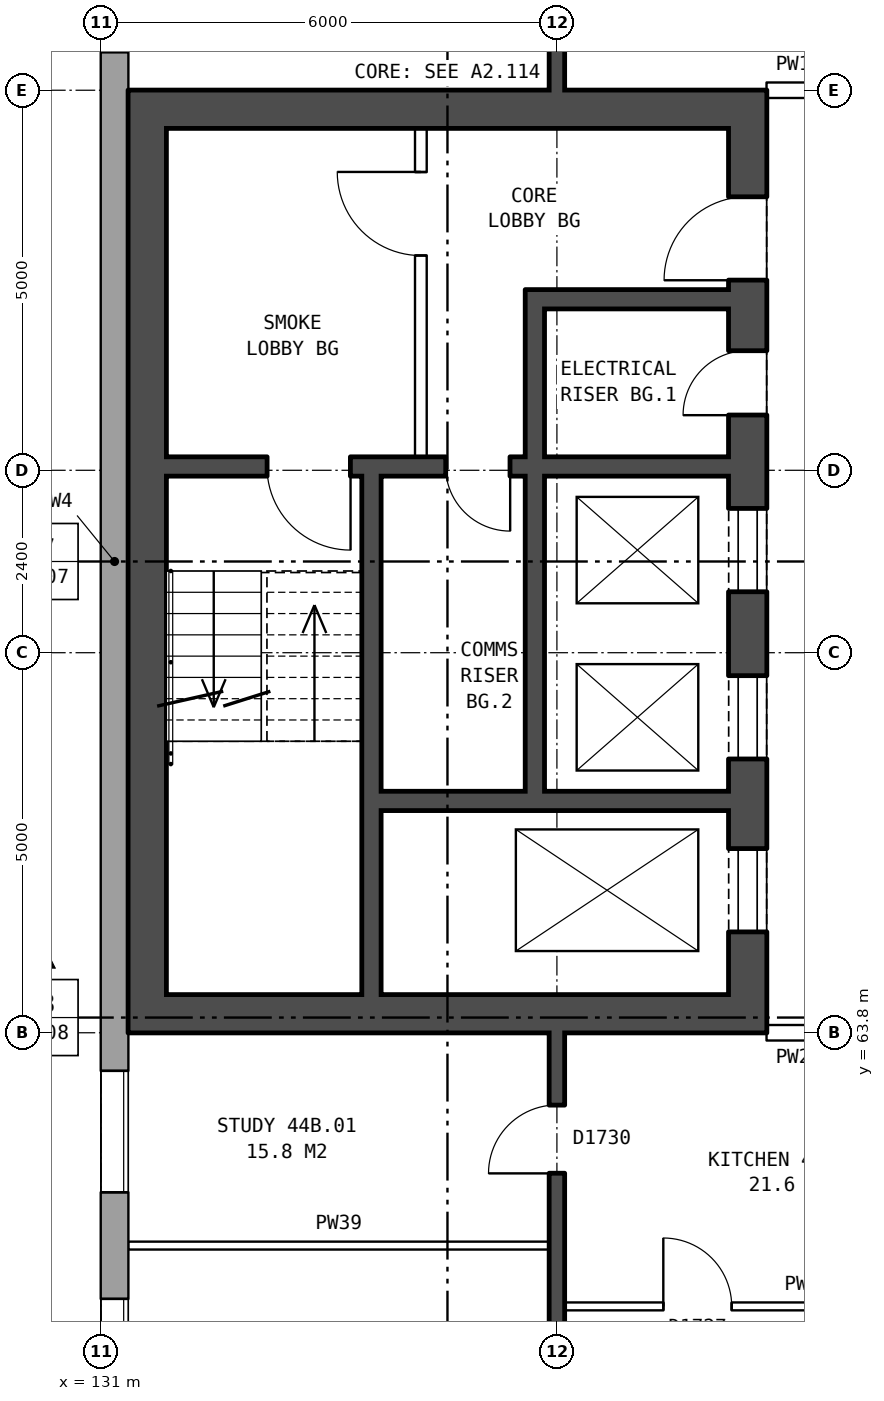
"""IFC4 building model, lengths in metres.
Left out: names, types, materials, properties, quantities, classifications, styles, units other than length and angle.
Written with IfcOpenShell. Run it as: python <this file> out.ifc"""

import sys

from ifc_helpers import new_model, si_unit, direction, frame, frame_2d, origin, place, context, subcontext, project, spatial, rectangle, extrude, element, fill, save


model = new_model("IFC4")
c1 = context("Model", 3, precision=1e-05, world=origin(), true_north=direction((0.0, 1.0)))
c2 = subcontext(c1, "Body", "Model", "MODEL_VIEW")
j1 = project(units=[si_unit("LENGTHUNIT", "METRE"), si_unit("PLANEANGLEUNIT", "RADIAN")], contexts=[c1])
p1 = place(None, origin())
s1 = spatial("IfcSite", under=j1, at=p1, CompositionType="ELEMENT")
p2 = place(p1, origin())
s2 = spatial("IfcBuilding", under=s1, at=p2, CompositionType="ELEMENT")
p3 = place(p2, frame((0.0, 0.0, 157.8)))
s3 = spatial("IfcBuildingStorey", under=s2, at=p3, CompositionType="ELEMENT", Elevation=157.8)
p4 = place(p3, frame((131.18, 82.925, 0.0), z_axis=(0.0, 0.0, 1.0), x_axis=(0.0, -1.0, 0.0)))
e1 = element("IfcWall", 1, at=p4, inside=s3, PredefinedType="STANDARD", context=c2, shape_type="SweptSolid", body=[
    extrude(rectangle(XDim=25.851, YDim=0.36, at=frame_2d((12.925, 0.0))), origin(), (0.0, 0.0, 1.0), 2.85),
])
p5 = place(p4, frame((1.625, 0.0, 0.8)))
e2 = element("IfcOpeningElement", 2, at=p5, cuts=e1, PredefinedType="OPENING", context=c2, shape_type="SweptSolid", body=[
    extrude(rectangle(XDim=1.6, YDim=1.8, at=frame_2d((0.8, 0.9))), frame((0.0, 0.19, 0.0), z_axis=(0.0, -1.0, 0.0), x_axis=(1.0, 0.0, 0.0)), (0.0, 0.0, 1.0), 0.38),
])
p6 = place(p4, frame((4.625, 0.0, 0.8)))
e3 = element("IfcOpeningElement", 3, at=p6, cuts=e1, PredefinedType="OPENING", context=c2, shape_type="SweptSolid", body=[
    extrude(rectangle(XDim=1.6, YDim=1.8, at=frame_2d((0.8, 0.9))), frame((0.0, 0.19, 0.0), z_axis=(0.0, -1.0, 0.0), x_axis=(1.0, 0.0, 0.0)), (0.0, 0.0, 1.0), 0.38),
])
p7 = place(p4, frame((19.625, 0.0, 0.8)))
e4 = element("IfcOpeningElement", 4, at=p7, cuts=e1, PredefinedType="OPENING", context=c2, shape_type="SweptSolid", body=[
    extrude(rectangle(XDim=1.6, YDim=1.8, at=frame_2d((0.8, 0.9))), frame((0.0, 0.19, 0.0), z_axis=(0.0, -1.0, 0.0), x_axis=(1.0, 0.0, 0.0)), (0.0, 0.0, 1.0), 0.38),
])
p8 = place(p4, frame((22.625, 0.0, 0.8)))
e5 = element("IfcOpeningElement", 5, at=p8, cuts=e1, PredefinedType="OPENING", context=c2, shape_type="SweptSolid", body=[
    extrude(rectangle(XDim=1.6, YDim=1.8, at=frame_2d((0.8, 0.9))), frame((0.0, 0.19, 0.0), z_axis=(0.0, -1.0, 0.0), x_axis=(1.0, 0.0, 0.0)), (0.0, 0.0, 1.0), 0.38),
])
p9 = place(p3, frame((139.51, 63.8, 0.0), z_axis=(0.0, 0.0, 1.0), x_axis=(0.0, 1.0, 0.0)))
e6 = element("IfcWall", 6, at=p9, inside=s3, PredefinedType="SHEAR", context=c2, shape_type="SweptSolid", body=[
    extrude(rectangle(XDim=12.4, YDim=0.5, at=frame_2d((6.2, 0.0))), origin(), (0.0, 0.0, 1.0), 2.85),
])
p10 = place(p9, frame((1.325, 0.0, 0.0)))
e7 = element("IfcOpeningElement", 7, at=p10, cuts=e6, PredefinedType="OPENING", context=c2, shape_type="SweptSolid", body=[
    extrude(rectangle(XDim=1.1, YDim=2.1, at=frame_2d((0.55, 1.05))), frame((0.0, 0.26, 0.0), z_axis=(0.0, -1.0, 0.0), x_axis=(1.0, 0.0, 0.0)), (0.0, 0.0, 1.0), 0.52),
])
p11 = place(p9, frame((3.6, 0.0, 0.0)))
e8 = element("IfcOpeningElement", 8, at=p11, cuts=e6, PredefinedType="OPENING", context=c2, shape_type="SweptSolid", body=[
    extrude(rectangle(XDim=1.1, YDim=2.1, at=frame_2d((0.55, 1.05))), frame((0.0, 0.26, 0.0), z_axis=(0.0, -1.0, 0.0), x_axis=(1.0, 0.0, 0.0)), (0.0, 0.0, 1.0), 0.52),
])
p12 = place(p9, frame((5.8, 0.0, 0.0)))
e9 = element("IfcOpeningElement", 9, at=p12, cuts=e6, PredefinedType="OPENING", context=c2, shape_type="SweptSolid", body=[
    extrude(rectangle(XDim=1.1, YDim=2.1, at=frame_2d((0.55, 1.05))), frame((0.0, 0.26, 0.0), z_axis=(0.0, -1.0, 0.0), x_axis=(1.0, 0.0, 0.0)), (0.0, 0.0, 1.0), 0.52),
])
p13 = place(p9, frame((9.9, 0.0, 0.0)))
e10 = element("IfcOpeningElement", 10, at=p13, cuts=e6, PredefinedType="OPENING", context=c2, shape_type="SweptSolid", body=[
    extrude(rectangle(XDim=1.1, YDim=2.1, at=frame_2d((0.55, 1.05))), frame((0.0, 0.26, 0.0), z_axis=(0.0, -1.0, 0.0), x_axis=(1.0, 0.0, 0.0)), (0.0, 0.0, 1.0), 0.52),
])
p14 = place(p9, frame((8.125, 0.0, 0.0)))
e11 = element("IfcOpeningElement", 11, at=p14, cuts=e6, PredefinedType="OPENING", context=c2, shape_type="SweptSolid", body=[
    extrude(rectangle(XDim=0.85, YDim=2.1, at=frame_2d((0.425, 1.05))), frame((0.0, 0.26, 0.0), z_axis=(0.0, -1.0, 0.0), x_axis=(1.0, 0.0, 0.0)), (0.0, 0.0, 1.0), 0.52),
])
p15 = place(p3, frame((131.61, 63.8, 0.0), z_axis=(0.0, 0.0, 1.0), x_axis=(0.0, 1.0, 0.0)))
e12 = element("IfcWall", 12, at=p15, inside=s3, PredefinedType="SHEAR", context=c2, shape_type="SweptSolid", body=[
    extrude(rectangle(XDim=12.4, YDim=0.5, at=frame_2d((6.2, 0.0))), origin(), (0.0, 0.0, 1.0), 2.85),
])
for number, where, z_axis, x_axis in (
    (13, (139.26, 64.05, 0.0), (0.0, 0.0, 1.0), (-1.0, 0.0, 0.0)),
    (14, (139.26, 75.95, 0.0), (0.0, 0.0, 1.0), (-1.0, 0.0, 0.0)),
):
    element("IfcWall", number, at=place(p3, frame(where, z_axis=z_axis, x_axis=x_axis)), inside=s3, PredefinedType="SHEAR", context=c2, shape_type="SweptSolid", body=[
        extrude(rectangle(XDim=7.4, YDim=0.5, at=frame_2d((3.7, 0.0))), origin(), (0.0, 0.0, 1.0), 2.85),
    ])
p16 = place(p3, frame((139.26, 66.85, 0.0), z_axis=(0.0, 0.0, 1.0), x_axis=(-1.0, 0.0, 0.0)))
e15 = element("IfcWall", 15, at=p16, inside=s3, PredefinedType="SHEAR", context=c2, shape_type="SweptSolid", body=[
    extrude(rectangle(XDim=4.575, YDim=0.25, at=frame_2d((2.288, 0.0))), origin(), (0.0, 0.0, 1.0), 2.85),
])
p17 = place(p3, frame((139.26, 71.25, 0.0), z_axis=(0.0, 0.0, 1.0), x_axis=(-1.0, 0.0, 0.0)))
e16 = element("IfcWall", 16, at=p17, inside=s3, PredefinedType="SHEAR", context=c2, shape_type="SweptSolid", body=[
    extrude(rectangle(XDim=7.4, YDim=0.25, at=frame_2d((3.7, 0.0))), origin(), (0.0, 0.0, 1.0), 2.85),
])
p18 = place(p17, frame((4.975, 0.0, 0.0)))
e17 = element("IfcOpeningElement", 17, at=p18, cuts=e16, PredefinedType="OPENING", context=c2, shape_type="SweptSolid", body=[
    extrude(rectangle(XDim=1.1, YDim=2.1, at=frame_2d((0.55, 1.05))), frame((0.0, 0.135, 0.0), z_axis=(0.0, -1.0, 0.0), x_axis=(1.0, 0.0, 0.0)), (0.0, 0.0, 1.0), 0.27),
])
p19 = place(p17, frame((2.875, 0.0, 0.0)))
e18 = element("IfcOpeningElement", 18, at=p19, cuts=e16, PredefinedType="OPENING", context=c2, shape_type="SweptSolid", body=[
    extrude(rectangle(XDim=0.85, YDim=2.1, at=frame_2d((0.425, 1.05))), frame((0.0, 0.135, 0.0), z_axis=(0.0, -1.0, 0.0), x_axis=(1.0, 0.0, 0.0)), (0.0, 0.0, 1.0), 0.27),
])
p20 = place(p3, frame((139.26, 73.45, 0.0), z_axis=(0.0, 0.0, 1.0), x_axis=(-1.0, 0.0, 0.0)))
e19 = element("IfcWall", 19, at=p20, inside=s3, PredefinedType="SHEAR", context=c2, shape_type="SweptSolid", body=[
    extrude(rectangle(XDim=2.425, YDim=0.25, at=frame_2d((1.212, 0.0))), origin(), (0.0, 0.0, 1.0), 2.85),
])
p21 = place(p3, frame((136.71, 66.975, 0.0), z_axis=(0.0, 0.0, 1.0), x_axis=(0.0, 1.0, 0.0)))
e20 = element("IfcWall", 20, at=p21, inside=s3, PredefinedType="SHEAR", context=c2, shape_type="SweptSolid", body=[
    extrude(rectangle(XDim=4.15, YDim=0.25, at=frame_2d((2.075, 0.0))), origin(), (0.0, 0.0, 1.0), 2.85),
])
p22 = place(p3, frame((136.71, 71.375, 0.0), z_axis=(0.0, 0.0, 1.0), x_axis=(0.0, 1.0, 0.0)))
e21 = element("IfcWall", 21, at=p22, inside=s3, PredefinedType="SHEAR", context=c2, shape_type="SweptSolid", body=[
    extrude(rectangle(XDim=2.2, YDim=0.25, at=frame_2d((1.1, 0.0))), origin(), (0.0, 0.0, 1.0), 2.85),
])
p23 = place(p3, frame((135.21, 71.375, 0.0), z_axis=(0.0, 0.0, 1.0), x_axis=(0.0, 1.0, 0.0)))
e22 = element("IfcWall", 22, at=p23, inside=s3, PredefinedType="PARTITIONING", context=c2, shape_type="SweptSolid", body=[
    extrude(rectangle(XDim=4.325, YDim=0.15, at=frame_2d((2.163, 0.0))), origin(), (0.0, 0.0, 1.0), 2.85),
])
p24 = place(p23, frame((2.65, 0.0, 0.0)))
e23 = element("IfcOpeningElement", 23, at=p24, cuts=e22, PredefinedType="OPENING", context=c2, shape_type="SweptSolid", body=[
    extrude(rectangle(XDim=1.1, YDim=2.1, at=frame_2d((0.55, 1.05))), frame((0.0, 0.085, 0.0), z_axis=(0.0, -1.0, 0.0), x_axis=(1.0, 0.0, 0.0)), (0.0, 0.0, 1.0), 0.17),
])
p25 = place(p3, frame((134.56, 64.3, 0.0), z_axis=(0.0, 0.0, 1.0), x_axis=(0.0, 1.0, 0.0)))
e24 = element("IfcWall", 24, at=p25, inside=s3, PredefinedType="SHEAR", context=c2, shape_type="SweptSolid", body=[
    extrude(rectangle(XDim=6.825, YDim=0.25, at=frame_2d((3.413, 0.0))), origin(), (0.0, 0.0, 1.0), 2.85),
])
p26 = place(p3, frame((137.1, 60.2, 0.0), z_axis=(0.0, 0.0, 1.0), x_axis=(1.0, 0.0, 0.0)))
e25 = element("IfcWall", 25, at=p26, inside=s3, PredefinedType="PARTITIONING", context=c2, shape_type="SweptSolid", body=[
    extrude(rectangle(XDim=5.8, YDim=0.1, at=frame_2d((2.9, 0.0))), origin(), (0.0, 0.0, 1.0), 2.85),
])
p27 = place(p26, frame((1.3, 0.0, 0.0)))
e26 = element("IfcOpeningElement", 26, at=p27, cuts=e25, PredefinedType="OPENING", context=c2, shape_type="SweptSolid", body=[
    extrude(rectangle(XDim=0.9, YDim=2.1, at=frame_2d((0.45, 1.05))), frame((0.0, 0.06, 0.0), z_axis=(0.0, -1.0, 0.0), x_axis=(1.0, 0.0, 0.0)), (0.0, 0.0, 1.0), 0.12),
])
p28 = place(p26, frame((4.2, 0.0, 0.0)))
e27 = element("IfcOpeningElement", 27, at=p28, cuts=e25, PredefinedType="OPENING", context=c2, shape_type="SweptSolid", body=[
    extrude(rectangle(XDim=0.9, YDim=2.1, at=frame_2d((0.45, 1.05))), frame((0.0, 0.06, 0.0), z_axis=(0.0, -1.0, 0.0), x_axis=(1.0, 0.0, 0.0)), (0.0, 0.0, 1.0), 0.12),
])
p29 = place(p3, frame((131.36, 61.0, 0.0), z_axis=(0.0, 0.0, 1.0), x_axis=(1.0, 0.0, 0.0)))
e28 = element("IfcWall", 28, at=p29, inside=s3, PredefinedType="PARTITIONING", context=c2, shape_type="SweptSolid", body=[
    extrude(rectangle(XDim=5.54, YDim=0.1, at=frame_2d((2.77, 0.0))), origin(), (0.0, 0.0, 1.0), 2.85),
])
p30 = place(p3, frame((139.76, 63.8, 0.0), z_axis=(0.0, 0.0, 1.0), x_axis=(1.0, 0.0, 0.0)))
e29 = element("IfcWall", 29, at=p30, inside=s3, PredefinedType="PARTITIONING", context=c2, shape_type="SweptSolid", body=[
    extrude(rectangle(XDim=3.0, YDim=0.2, at=frame_2d((1.5, 0.0))), origin(), (0.0, 0.0, 1.0), 2.85),
])
p31 = place(p30, frame((1.0, 0.0, 0.0)))
e30 = element("IfcOpeningElement", 30, at=p31, cuts=e29, PredefinedType="OPENING", context=c2, shape_type="SweptSolid", body=[
    extrude(rectangle(XDim=1.0, YDim=2.1, at=frame_2d((0.5, 1.05))), frame((0.0, 0.11, 0.0), z_axis=(0.0, -1.0, 0.0), x_axis=(1.0, 0.0, 0.0)), (0.0, 0.0, 1.0), 0.22),
])
p32 = place(p3, frame((139.76, 76.2, 0.0), z_axis=(0.0, 0.0, 1.0), x_axis=(1.0, 0.0, 0.0)))
e31 = element("IfcWall", 31, at=p32, inside=s3, PredefinedType="PARTITIONING", context=c2, shape_type="SweptSolid", body=[
    extrude(rectangle(XDim=3.0, YDim=0.2, at=frame_2d((1.5, 0.0))), origin(), (0.0, 0.0, 1.0), 2.85),
])
p33 = place(p32, frame((1.0, 0.0, 0.0)))
e32 = element("IfcOpeningElement", 32, at=p33, cuts=e31, PredefinedType="OPENING", context=c2, shape_type="SweptSolid", body=[
    extrude(rectangle(XDim=1.0, YDim=2.1, at=frame_2d((0.5, 1.05))), frame((0.0, 0.11, 0.0), z_axis=(0.0, -1.0, 0.0), x_axis=(1.0, 0.0, 0.0)), (0.0, 0.0, 1.0), 0.22),
])
p34 = place(p3, frame((137.0, 54.36, 0.0), z_axis=(0.0, 0.0, 1.0), x_axis=(0.0, 1.0, 0.0)))
e33 = element("IfcWall", 33, at=p34, inside=s3, PredefinedType="SOLIDWALL", context=c2, shape_type="SweptSolid", body=[
    extrude(rectangle(XDim=9.44, YDim=0.2, at=frame_2d((4.72, 0.0))), origin(), (0.0, 0.0, 1.0), 2.85),
])
p35 = place(p34, frame((2.47, 0.0, 0.0)))
e34 = element("IfcOpeningElement", 34, at=p35, cuts=e33, PredefinedType="OPENING", context=c2, shape_type="SweptSolid", body=[
    extrude(rectangle(XDim=0.9, YDim=2.1, at=frame_2d((0.45, 1.05))), frame((0.0, 0.11, 0.0), z_axis=(0.0, -1.0, 0.0), x_axis=(1.0, 0.0, 0.0)), (0.0, 0.0, 1.0), 0.22),
])
p36 = place(p34, frame((7.59, 0.0, 0.0)))
e35 = element("IfcOpeningElement", 35, at=p36, cuts=e33, PredefinedType="OPENING", context=c2, shape_type="SweptSolid", body=[
    extrude(rectangle(XDim=0.9, YDim=2.1, at=frame_2d((0.45, 1.05))), frame((0.0, 0.11, 0.0), z_axis=(0.0, -1.0, 0.0), x_axis=(1.0, 0.0, 0.0)), (0.0, 0.0, 1.0), 0.22),
])
p37 = place(p3, frame((137.0, 76.2, 0.0), z_axis=(0.0, 0.0, 1.0), x_axis=(0.0, 1.0, 0.0)))
e36 = element("IfcWall", 36, at=p37, inside=s3, PredefinedType="SOLIDWALL", context=c2, shape_type="SweptSolid", body=[
    extrude(rectangle(XDim=9.44, YDim=0.2, at=frame_2d((4.72, 0.0))), origin(), (0.0, 0.0, 1.0), 2.85),
])
p38 = place(p37, frame((1.35, 0.0, 0.0)))
e37 = element("IfcOpeningElement", 37, at=p38, cuts=e36, PredefinedType="OPENING", context=c2, shape_type="SweptSolid", body=[
    extrude(rectangle(XDim=0.9, YDim=2.1, at=frame_2d((0.45, 1.05))), frame((0.0, 0.11, 0.0), z_axis=(0.0, -1.0, 0.0), x_axis=(1.0, 0.0, 0.0)), (0.0, 0.0, 1.0), 0.22),
])
p39 = place(p6, origin())
e38 = element("IfcWindow", 38, at=p39, inside=s3, PartitioningType="SINGLE_PANEL", PredefinedType="WINDOW", context=c2, shape_type="SweptSolid", body=[
    extrude(rectangle(XDim=1.6, YDim=1.8, at=frame_2d((0.8, 0.9))), frame((0.0, 0.15, 0.0), z_axis=(0.0, -1.0, 0.0), x_axis=(1.0, 0.0, 0.0)), (0.0, 0.0, 1.0), 0.06),
])
fill(e3, e38)
p40 = place(p7, origin())
e39 = element("IfcWindow", 39, at=p40, inside=s3, PartitioningType="SINGLE_PANEL", PredefinedType="WINDOW", context=c2, shape_type="SweptSolid", body=[
    extrude(rectangle(XDim=1.6, YDim=1.8, at=frame_2d((0.8, 0.9))), frame((0.0, 0.15, 0.0), z_axis=(0.0, -1.0, 0.0), x_axis=(1.0, 0.0, 0.0)), (0.0, 0.0, 1.0), 0.06),
])
fill(e4, e39)
p41 = place(p8, origin())
e40 = element("IfcWindow", 40, at=p41, inside=s3, PartitioningType="SINGLE_PANEL", PredefinedType="WINDOW", context=c2, shape_type="SweptSolid", body=[
    extrude(rectangle(XDim=1.6, YDim=1.8, at=frame_2d((0.8, 0.9))), frame((0.0, 0.15, 0.0), z_axis=(0.0, -1.0, 0.0), x_axis=(1.0, 0.0, 0.0)), (0.0, 0.0, 1.0), 0.06),
])
fill(e5, e40)
p42 = place(p10, origin())
e41 = element("IfcDoor", 41, at=p42, inside=s3, OperationType="DOUBLE_DOOR_SLIDING", PredefinedType="DOOR", context=c2, shape_type="SweptSolid", body=[
    extrude(rectangle(XDim=1.1, YDim=2.1, at=frame_2d((0.55, 1.05))), frame((0.0, 0.235, 0.0), z_axis=(0.0, -1.0, 0.0), x_axis=(1.0, 0.0, 0.0)), (0.0, 0.0, 1.0), 0.05),
])
fill(e7, e41)
p43 = place(p11, origin())
e42 = element("IfcDoor", 42, at=p43, inside=s3, OperationType="DOUBLE_DOOR_SLIDING", PredefinedType="DOOR", context=c2, shape_type="SweptSolid", body=[
    extrude(rectangle(XDim=1.1, YDim=2.1, at=frame_2d((0.55, 1.05))), frame((0.0, 0.235, 0.0), z_axis=(0.0, -1.0, 0.0), x_axis=(1.0, 0.0, 0.0)), (0.0, 0.0, 1.0), 0.05),
])
fill(e8, e42)
p44 = place(p12, origin())
e43 = element("IfcDoor", 43, at=p44, inside=s3, OperationType="DOUBLE_DOOR_SLIDING", PredefinedType="DOOR", context=c2, shape_type="SweptSolid", body=[
    extrude(rectangle(XDim=1.1, YDim=2.1, at=frame_2d((0.55, 1.05))), frame((0.0, 0.235, 0.0), z_axis=(0.0, -1.0, 0.0), x_axis=(1.0, 0.0, 0.0)), (0.0, 0.0, 1.0), 0.05),
])
fill(e9, e43)
p45 = place(p13, origin())
e44 = element("IfcDoor", 44, at=p45, inside=s3, OperationType="SINGLE_SWING_LEFT", PredefinedType="DOOR", context=c2, shape_type="SweptSolid", body=[
    extrude(rectangle(XDim=1.1, YDim=2.1, at=frame_2d((0.55, 1.05))), frame((0.0, 0.235, 0.0), z_axis=(0.0, -1.0, 0.0), x_axis=(1.0, 0.0, 0.0)), (0.0, 0.0, 1.0), 0.05),
])
fill(e10, e44)
p46 = place(p24, origin())
e45 = element("IfcDoor", 45, at=p46, inside=s3, OperationType="SINGLE_SWING_RIGHT", PredefinedType="DOOR", context=c2, shape_type="SweptSolid", body=[
    extrude(rectangle(XDim=1.1, YDim=2.1, at=frame_2d((0.55, 1.05))), frame((0.0, 0.025, 0.0), z_axis=(0.0, -1.0, 0.0), x_axis=(1.0, 0.0, 0.0)), (0.0, 0.0, 1.0), 0.05),
])
fill(e23, e45)
p47 = place(p18, origin())
e46 = element("IfcDoor", 46, at=p47, inside=s3, OperationType="SINGLE_SWING_LEFT", PredefinedType="DOOR", context=c2, shape_type="SweptSolid", body=[
    extrude(rectangle(XDim=1.1, YDim=2.1, at=frame_2d((0.55, 1.05))), frame((0.0, 0.025, 0.0), z_axis=(0.0, -1.0, 0.0), x_axis=(1.0, 0.0, 0.0)), (0.0, 0.0, 1.0), 0.05),
])
fill(e17, e46)
p48 = place(p14, origin())
e47 = element("IfcDoor", 47, at=p48, inside=s3, OperationType="SINGLE_SWING_LEFT", PredefinedType="DOOR", context=c2, shape_type="SweptSolid", body=[
    extrude(rectangle(XDim=0.85, YDim=2.1, at=frame_2d((0.425, 1.05))), frame((0.0, 0.235, 0.0), z_axis=(0.0, -1.0, 0.0), x_axis=(1.0, 0.0, 0.0)), (0.0, 0.0, 1.0), 0.05),
])
fill(e11, e47)
p49 = place(p19, origin())
e48 = element("IfcDoor", 48, at=p49, inside=s3, OperationType="SINGLE_SWING_LEFT", PredefinedType="DOOR", context=c2, shape_type="SweptSolid", body=[
    extrude(rectangle(XDim=0.85, YDim=2.1, at=frame_2d((0.425, 1.05))), frame((0.0, 0.025, 0.0), z_axis=(0.0, -1.0, 0.0), x_axis=(1.0, 0.0, 0.0)), (0.0, 0.0, 1.0), 0.05),
])
fill(e18, e48)
p50 = place(p36, origin())
e49 = element("IfcDoor", 49, at=p50, inside=s3, OperationType="SINGLE_SWING_LEFT", PredefinedType="DOOR", context=c2, shape_type="SweptSolid", body=[
    extrude(rectangle(XDim=0.9, YDim=2.1, at=frame_2d((0.45, 1.05))), frame((0.0, 0.025, 0.0), z_axis=(0.0, -1.0, 0.0), x_axis=(1.0, 0.0, 0.0)), (0.0, 0.0, 1.0), 0.05),
])
fill(e35, e49)
p51 = place(p27, origin())
e50 = element("IfcDoor", 50, at=p51, inside=s3, OperationType="SINGLE_SWING_LEFT", PredefinedType="DOOR", context=c2, shape_type="SweptSolid", body=[
    extrude(rectangle(XDim=0.9, YDim=2.1, at=frame_2d((0.45, 1.05))), frame((0.0, 0.025, 0.0), z_axis=(0.0, -1.0, 0.0), x_axis=(1.0, 0.0, 0.0)), (0.0, 0.0, 1.0), 0.05),
])
fill(e26, e50)
save(model, sys.argv[1])
